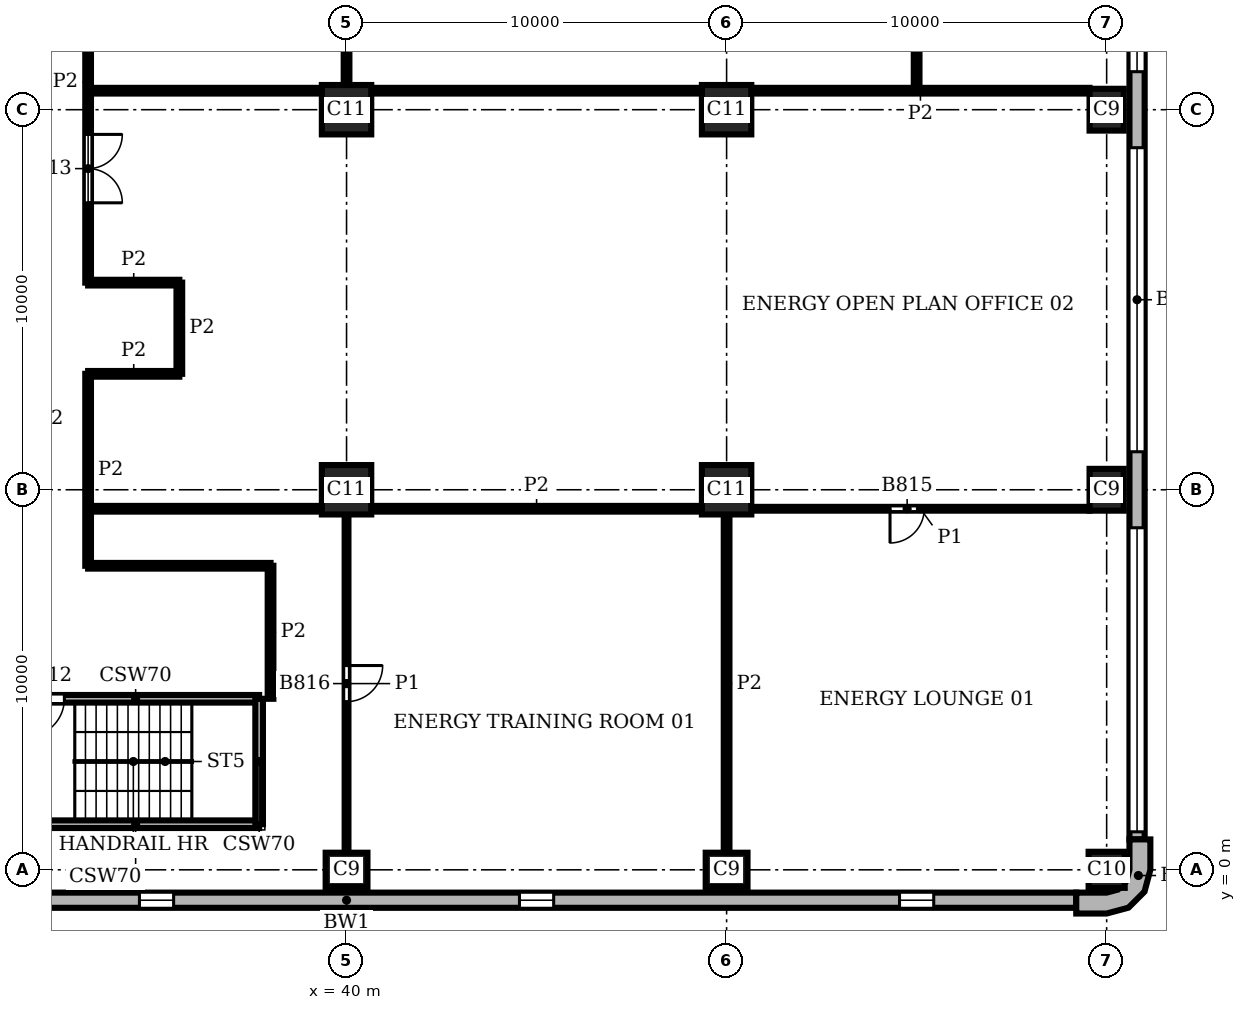
"""IFC4 building model, lengths in metres.
Left out: names, types, materials, properties, quantities, classifications, styles, units other than length and angle.
Written with IfcOpenShell. Run it as: python <this file> out.ifc"""

import sys

from ifc_helpers import new_model, si_unit, direction, frame, frame_2d, origin, origin_2d, place, context, subcontext, project, spatial, polyline, rectangle, outline, extrude, element, fill, save


model = new_model("IFC4")
c1 = context("Model", 3, precision=1e-05, world=origin(), true_north=direction((0.0, 1.0)))
c2 = subcontext(c1, "Body", "Model", "MODEL_VIEW")
j1 = project(units=[si_unit("LENGTHUNIT", "METRE"), si_unit("PLANEANGLEUNIT", "RADIAN")], contexts=[c1])
p1 = place(None, origin())
s1 = spatial("IfcSite", under=j1, at=p1, CompositionType="ELEMENT")
p2 = place(p1, origin())
s2 = spatial("IfcBuilding", under=s1, at=p2, CompositionType="ELEMENT")
p3 = place(p2, frame((0.0, 0.0, 213.6)))
s3 = spatial("IfcBuildingStorey", under=s2, at=p3, CompositionType="ELEMENT", Elevation=213.6)
for number, where, z_axis, x_axis in (
    (1, (40.0, 0.0, 0.0), (0.0, 0.0, 1.0), (1.0, 0.0, 0.0)),
    (2, (50.0, 0.0, 0.0), (0.0, 0.0, 1.0), (1.0, 0.0, 0.0)),
):
    element("IfcColumn", number, at=place(p3, frame(where, z_axis=z_axis, x_axis=x_axis)), inside=s3, PredefinedType="COLUMN", context=c2, shape_type="SweptSolid", body=[
        extrude(rectangle(XDim=1.1, YDim=0.9, at=origin_2d()), origin(), (0.0, 0.0, 1.0), 3.9),
    ])
p4 = place(p3, frame((60.0, 0.0, 0.0), z_axis=(0.0, 0.0, 1.0), x_axis=(1.0, 0.0, 0.0)))
e3 = element("IfcColumn", 3, at=p4, inside=s3, PredefinedType="COLUMN", context=c2, shape_type="SweptSolid", body=[
    extrude(rectangle(XDim=0.95, YDim=0.95, at=origin_2d()), origin(), (0.0, 0.0, 1.0), 3.9),
])
for number, where, z_axis, x_axis in (
    (4, (60.0, 10.0, 0.0), (0.0, 0.0, 1.0), (0.0, 1.0, 0.0)),
    (5, (60.0, 20.0, 0.0), (0.0, 0.0, 1.0), (0.0, 1.0, 0.0)),
):
    element("IfcColumn", number, at=place(p3, frame(where, z_axis=z_axis, x_axis=x_axis)), inside=s3, PredefinedType="COLUMN", context=c2, shape_type="SweptSolid", body=[
        extrude(rectangle(XDim=1.1, YDim=0.9, at=origin_2d()), origin(), (0.0, 0.0, 1.0), 3.9),
    ])
for number, where, z_axis, x_axis in (
    (6, (40.0, 10.0, 0.0), (0.0, 0.0, 1.0), (1.0, 0.0, 0.0)),
    (7, (40.0, 20.0, 0.0), (0.0, 0.0, 1.0), (1.0, 0.0, 0.0)),
    (8, (50.0, 10.0, 0.0), (0.0, 0.0, 1.0), (1.0, 0.0, 0.0)),
    (9, (50.0, 20.0, 0.0), (0.0, 0.0, 1.0), (1.0, 0.0, 0.0)),
):
    element("IfcColumn", number, at=place(p3, frame(where, z_axis=z_axis, x_axis=x_axis)), inside=s3, PredefinedType="COLUMN", context=c2, shape_type="SweptSolid", body=[
        extrude(rectangle(XDim=1.3, YDim=1.3, at=origin_2d()), origin(), (0.0, 0.0, 1.0), 3.9),
    ])
p5 = place(p3, origin())
e10 = element("IfcWall", 10, at=p5, inside=s3, PredefinedType="SOLIDWALL", context=c2, shape_type="SweptSolid", body=[
    extrude(outline(polyline([(59.2, -1.0), (59.2, -1.15), (60.0, -1.15), (60.575, -0.996), (60.996, -0.575), (61.15, 0.0), (61.15, 0.8), (61.0, 0.8), (60.6, 0.8), (60.6, 0.0), (60.52, -0.3), (60.3, -0.52), (60.0, -0.6), (59.2, -0.6), (59.2, -1.0)])), origin(), (0.0, 0.0, 1.0), 3.9),
])
p6 = place(p3, frame((20.8, -0.8, 0.0), z_axis=(0.0, 0.0, 1.0), x_axis=(1.0, 0.0, 0.0)))
e11 = element("IfcWall", 11, at=p6, inside=s3, PredefinedType="SOLIDWALL", context=c2, shape_type="SweptSolid", body=[
    extrude(rectangle(XDim=38.4, YDim=0.4, at=frame_2d((19.2, 0.0))), origin(), (0.0, 0.0, 1.0), 3.9),
])
p7 = place(p6, frame((3.75, 0.0, 0.9)))
e12 = element("IfcOpeningElement", 12, at=p7, cuts=e11, PredefinedType="OPENING", context=c2, shape_type="SweptSolid", body=[
    extrude(rectangle(XDim=0.9, YDim=2.35, at=frame_2d((0.45, 1.175))), frame((0.0, 0.21, 0.0), z_axis=(0.0, -1.0, 0.0), x_axis=(1.0, 0.0, 0.0)), (0.0, 0.0, 1.0), 0.42),
])
p8 = place(p6, frame((13.75, 0.0, 0.9)))
e13 = element("IfcOpeningElement", 13, at=p8, cuts=e11, PredefinedType="OPENING", context=c2, shape_type="SweptSolid", body=[
    extrude(rectangle(XDim=0.9, YDim=2.35, at=frame_2d((0.45, 1.175))), frame((0.0, 0.21, 0.0), z_axis=(0.0, -1.0, 0.0), x_axis=(1.0, 0.0, 0.0)), (0.0, 0.0, 1.0), 0.42),
])
p9 = place(p6, frame((23.75, 0.0, 0.9)))
e14 = element("IfcOpeningElement", 14, at=p9, cuts=e11, PredefinedType="OPENING", context=c2, shape_type="SweptSolid", body=[
    extrude(rectangle(XDim=0.9, YDim=2.35, at=frame_2d((0.45, 1.175))), frame((0.0, 0.21, 0.0), z_axis=(0.0, -1.0, 0.0), x_axis=(1.0, 0.0, 0.0)), (0.0, 0.0, 1.0), 0.42),
])
p10 = place(p6, frame((33.75, 0.0, 0.9)))
e15 = element("IfcOpeningElement", 15, at=p10, cuts=e11, PredefinedType="OPENING", context=c2, shape_type="SweptSolid", body=[
    extrude(rectangle(XDim=0.9, YDim=2.35, at=frame_2d((0.45, 1.175))), frame((0.0, 0.21, 0.0), z_axis=(0.0, -1.0, 0.0), x_axis=(1.0, 0.0, 0.0)), (0.0, 0.0, 1.0), 0.42),
])
p11 = place(p3, frame((60.8, 0.8, 0.0), z_axis=(0.0, 0.0, 1.0), x_axis=(0.0, 1.0, 0.0)))
e16 = element("IfcWall", 16, at=p11, inside=s3, PredefinedType="SOLIDWALL", context=c2, shape_type="SweptSolid", body=[
    extrude(rectangle(XDim=28.4, YDim=0.4, at=frame_2d((14.2, 0.0))), origin(), (0.0, 0.0, 1.0), 3.9),
])
p12 = place(p11, frame((0.2, 0.0, 0.9)))
e17 = element("IfcOpeningElement", 17, at=p12, cuts=e16, PredefinedType="OPENING", context=c2, shape_type="SweptSolid", body=[
    extrude(rectangle(XDim=8.0, YDim=2.35, at=frame_2d((4.0, 1.175))), frame((0.0, 0.21, 0.0), z_axis=(0.0, -1.0, 0.0), x_axis=(1.0, 0.0, 0.0)), (0.0, 0.0, 1.0), 0.42),
])
p13 = place(p11, frame((10.2, 0.0, 0.9)))
e18 = element("IfcOpeningElement", 18, at=p13, cuts=e16, PredefinedType="OPENING", context=c2, shape_type="SweptSolid", body=[
    extrude(rectangle(XDim=8.0, YDim=2.35, at=frame_2d((4.0, 1.175))), frame((0.0, 0.21, 0.0), z_axis=(0.0, -1.0, 0.0), x_axis=(1.0, 0.0, 0.0)), (0.0, 0.0, 1.0), 0.42),
])
p14 = place(p11, frame((20.2, 0.0, 0.9)))
e19 = element("IfcOpeningElement", 19, at=p14, cuts=e16, PredefinedType="OPENING", context=c2, shape_type="SweptSolid", body=[
    extrude(rectangle(XDim=8.0, YDim=2.35, at=frame_2d((4.0, 1.175))), frame((0.0, 0.21, 0.0), z_axis=(0.0, -1.0, 0.0), x_axis=(1.0, 0.0, 0.0)), (0.0, 0.0, 1.0), 0.42),
])
p15 = place(p3, frame((31.2, 1.2, 0.0), z_axis=(0.0, 0.0, 1.0), x_axis=(1.0, 0.0, 0.0)))
e20 = element("IfcWall", 20, at=p15, inside=s3, PredefinedType="SHEAR", context=c2, shape_type="SweptSolid", body=[
    extrude(rectangle(XDim=6.5, YDim=0.2, at=frame_2d((3.25, 0.0))), origin(), (0.0, 0.0, 1.0), 3.58),
])
p16 = place(p3, frame((31.2, 4.5, 0.0), z_axis=(0.0, 0.0, 1.0), x_axis=(1.0, 0.0, 0.0)))
e21 = element("IfcWall", 21, at=p16, inside=s3, PredefinedType="SHEAR", context=c2, shape_type="SweptSolid", body=[
    extrude(rectangle(XDim=6.5, YDim=0.2, at=frame_2d((3.25, 0.0))), origin(), (0.0, 0.0, 1.0), 3.58),
])
p17 = place(p16, frame((0.375, 0.0, 0.0)))
e22 = element("IfcOpeningElement", 22, at=p17, cuts=e21, PredefinedType="OPENING", context=c2, shape_type="SweptSolid", body=[
    extrude(rectangle(XDim=1.0, YDim=2.1, at=frame_2d((0.5, 1.05))), frame((0.0, 0.11, 0.0), z_axis=(0.0, -1.0, 0.0), x_axis=(1.0, 0.0, 0.0)), (0.0, 0.0, 1.0), 0.22),
])
p18 = place(p3, frame((37.7, 1.2, 0.0), z_axis=(0.0, 0.0, 1.0), x_axis=(0.0, 1.0, 0.0)))
e23 = element("IfcWall", 23, at=p18, inside=s3, PredefinedType="SHEAR", context=c2, shape_type="SweptSolid", body=[
    extrude(rectangle(XDim=3.3, YDim=0.2, at=frame_2d((1.65, 0.0))), origin(), (0.0, 0.0, 1.0), 3.58),
])
p19 = place(p3, frame((40.0, 0.45, 0.0), z_axis=(0.0, 0.0, 1.0), x_axis=(0.0, 1.0, 0.0)))
e24 = element("IfcWall", 24, at=p19, inside=s3, PredefinedType="PARTITIONING", context=c2, shape_type="SweptSolid", body=[
    extrude(rectangle(XDim=8.9, YDim=0.1, at=frame_2d((4.45, 0.0))), origin(), (0.0, 0.0, 1.0), 3.58),
])
p20 = place(p19, frame((3.975, 0.0, 0.0)))
e25 = element("IfcOpeningElement", 25, at=p20, cuts=e24, PredefinedType="OPENING", context=c2, shape_type="SweptSolid", body=[
    extrude(rectangle(XDim=0.95, YDim=2.1, at=frame_2d((0.475, 1.05))), frame((0.0, 0.06, 0.0), z_axis=(0.0, -1.0, 0.0), x_axis=(1.0, 0.0, 0.0)), (0.0, 0.0, 1.0), 0.12),
])
p21 = place(p3, frame((50.65, 9.5, 0.0), z_axis=(0.0, 0.0, 1.0), x_axis=(1.0, 0.0, 0.0)))
e26 = element("IfcWall", 26, at=p21, inside=s3, PredefinedType="PARTITIONING", context=c2, shape_type="SweptSolid", body=[
    extrude(rectangle(XDim=8.9, YDim=0.1, at=frame_2d((4.45, 0.0))), origin(), (0.0, 0.0, 1.0), 3.58),
])
p22 = place(p21, frame((3.65, 0.0, 0.0)))
e27 = element("IfcOpeningElement", 27, at=p22, cuts=e26, PredefinedType="OPENING", context=c2, shape_type="SweptSolid", body=[
    extrude(rectangle(XDim=0.9, YDim=2.1, at=frame_2d((0.45, 1.05))), frame((0.0, 0.06, 0.0), z_axis=(0.0, -1.0, 0.0), x_axis=(1.0, 0.0, 0.0)), (0.0, 0.0, 1.0), 0.12),
])
p23 = place(p3, frame((33.2, 8.0, 0.0), z_axis=(0.0, 0.0, 1.0), x_axis=(0.0, 1.0, 0.0)))
e28 = element("IfcWall", 28, at=p23, inside=s3, PredefinedType="PARTITIONING", context=c2, shape_type="SweptSolid", body=[
    extrude(rectangle(XDim=5.05, YDim=0.15, at=frame_2d((2.525, 0.0))), origin(), (0.0, 0.0, 1.0), 3.58),
])
p24 = place(p3, frame((33.2, 15.45, 0.0), z_axis=(0.0, 0.0, 1.0), x_axis=(0.0, 1.0, 0.0)))
e29 = element("IfcWall", 29, at=p24, inside=s3, PredefinedType="PARTITIONING", context=c2, shape_type="SweptSolid", body=[
    extrude(rectangle(XDim=10.55, YDim=0.15, at=frame_2d((5.275, 0.0))), origin(), (0.0, 0.0, 1.0), 3.58),
])
p25 = place(p24, frame((2.1, 0.0, 0.0)))
e30 = element("IfcOpeningElement", 30, at=p25, cuts=e29, PredefinedType="OPENING", context=c2, shape_type="SweptSolid", body=[
    extrude(rectangle(XDim=1.8, YDim=2.1, at=frame_2d((0.9, 1.05))), frame((0.0, 0.085, 0.0), z_axis=(0.0, -1.0, 0.0), x_axis=(1.0, 0.0, 0.0)), (0.0, 0.0, 1.0), 0.17),
])
p26 = place(p3, frame((35.6, 13.05, 0.0), z_axis=(0.0, 0.0, 1.0), x_axis=(0.0, 1.0, 0.0)))
e31 = element("IfcWall", 31, at=p26, inside=s3, PredefinedType="PARTITIONING", context=c2, shape_type="SweptSolid", body=[
    extrude(rectangle(XDim=2.4, YDim=0.15, at=frame_2d((1.2, 0.0))), origin(), (0.0, 0.0, 1.0), 3.58),
])
p27 = place(p3, frame((38.0, 4.5, 0.0), z_axis=(0.0, 0.0, 1.0), x_axis=(0.0, 1.0, 0.0)))
e32 = element("IfcWall", 32, at=p27, inside=s3, PredefinedType="PARTITIONING", context=c2, shape_type="SweptSolid", body=[
    extrude(rectangle(XDim=3.5, YDim=0.15, at=frame_2d((1.75, 0.0))), origin(), (0.0, 0.0, 1.0), 3.58),
])
p28 = place(p3, frame((40.0, 20.65, 0.0), z_axis=(0.0, 0.0, 1.0), x_axis=(0.0, 1.0, 0.0)))
e33 = element("IfcWall", 33, at=p28, inside=s3, PredefinedType="PARTITIONING", context=c2, shape_type="SweptSolid", body=[
    extrude(rectangle(XDim=5.35, YDim=0.15, at=frame_2d((2.675, 0.0))), origin(), (0.0, 0.0, 1.0), 3.58),
])
p29 = place(p3, frame((50.0, 0.45, 0.0), z_axis=(0.0, 0.0, 1.0), x_axis=(0.0, 1.0, 0.0)))
e34 = element("IfcWall", 34, at=p29, inside=s3, PredefinedType="PARTITIONING", context=c2, shape_type="SweptSolid", body=[
    extrude(rectangle(XDim=8.9, YDim=0.15, at=frame_2d((4.45, 0.0))), origin(), (0.0, 0.0, 1.0), 3.58),
])
p30 = place(p3, frame((55.0, 20.5, 0.0), z_axis=(0.0, 0.0, 1.0), x_axis=(0.0, 1.0, 0.0)))
e35 = element("IfcWall", 35, at=p30, inside=s3, PredefinedType="PARTITIONING", context=c2, shape_type="SweptSolid", body=[
    extrude(rectangle(XDim=5.5, YDim=0.15, at=frame_2d((2.75, 0.0))), origin(), (0.0, 0.0, 1.0), 3.58),
])
p31 = place(p3, frame((33.2, 8.0, 0.0), z_axis=(0.0, 0.0, 1.0), x_axis=(1.0, 0.0, 0.0)))
e36 = element("IfcWall", 36, at=p31, inside=s3, PredefinedType="PARTITIONING", context=c2, shape_type="SweptSolid", body=[
    extrude(rectangle(XDim=4.8, YDim=0.15, at=frame_2d((2.4, 0.0))), origin(), (0.0, 0.0, 1.0), 3.58),
])
p32 = place(p3, frame((33.2, 9.5, 0.0), z_axis=(0.0, 0.0, 1.0), x_axis=(1.0, 0.0, 0.0)))
e37 = element("IfcWall", 37, at=p32, inside=s3, PredefinedType="PARTITIONING", context=c2, shape_type="SweptSolid", body=[
    extrude(rectangle(XDim=6.15, YDim=0.15, at=frame_2d((3.075, 0.0))), origin(), (0.0, 0.0, 1.0), 3.58),
])
p33 = place(p3, frame((40.65, 9.5, 0.0), z_axis=(0.0, 0.0, 1.0), x_axis=(1.0, 0.0, 0.0)))
e38 = element("IfcWall", 38, at=p33, inside=s3, PredefinedType="PARTITIONING", context=c2, shape_type="SweptSolid", body=[
    extrude(rectangle(XDim=8.7, YDim=0.15, at=frame_2d((4.35, 0.0))), origin(), (0.0, 0.0, 1.0), 3.58),
])
for number, where, z_axis, x_axis in (
    (39, (33.2, 13.05, 0.0), (0.0, 0.0, 1.0), (1.0, 0.0, 0.0)),
    (40, (33.2, 15.45, 0.0), (0.0, 0.0, 1.0), (1.0, 0.0, 0.0)),
):
    element("IfcWall", number, at=place(p3, frame(where, z_axis=z_axis, x_axis=x_axis)), inside=s3, PredefinedType="PARTITIONING", context=c2, shape_type="SweptSolid", body=[
        extrude(rectangle(XDim=2.4, YDim=0.15, at=frame_2d((1.2, 0.0))), origin(), (0.0, 0.0, 1.0), 3.58),
    ])
p34 = place(p3, frame((33.2, 20.5, 0.0), z_axis=(0.0, 0.0, 1.0), x_axis=(1.0, 0.0, 0.0)))
e41 = element("IfcWall", 41, at=p34, inside=s3, PredefinedType="PARTITIONING", context=c2, shape_type="SweptSolid", body=[
    extrude(rectangle(XDim=6.15, YDim=0.15, at=frame_2d((3.075, 0.0))), origin(), (0.0, 0.0, 1.0), 3.58),
])
p35 = place(p3, frame((40.65, 20.5, 0.0), z_axis=(0.0, 0.0, 1.0), x_axis=(1.0, 0.0, 0.0)))
e42 = element("IfcWall", 42, at=p35, inside=s3, PredefinedType="PARTITIONING", context=c2, shape_type="SweptSolid", body=[
    extrude(rectangle(XDim=8.7, YDim=0.15, at=frame_2d((4.35, 0.0))), origin(), (0.0, 0.0, 1.0), 3.58),
])
p36 = place(p3, frame((50.65, 20.5, 0.0), z_axis=(0.0, 0.0, 1.0), x_axis=(1.0, 0.0, 0.0)))
e43 = element("IfcWall", 43, at=p36, inside=s3, PredefinedType="PARTITIONING", context=c2, shape_type="SweptSolid", body=[
    extrude(rectangle(XDim=8.9, YDim=0.15, at=frame_2d((4.45, 0.0))), origin(), (0.0, 0.0, 1.0), 3.58),
])
p37 = place(p8, origin())
e44 = element("IfcWindow", 44, at=p37, inside=s3, PartitioningType="SINGLE_PANEL", PredefinedType="WINDOW", context=c2, shape_type="SweptSolid", body=[
    extrude(rectangle(XDim=0.9, YDim=2.35, at=frame_2d((0.45, 1.175))), frame((0.0, 0.16, 0.0), z_axis=(0.0, -1.0, 0.0), x_axis=(1.0, 0.0, 0.0)), (0.0, 0.0, 1.0), 0.06),
])
fill(e13, e44)
p38 = place(p9, origin())
e45 = element("IfcWindow", 45, at=p38, inside=s3, PartitioningType="SINGLE_PANEL", PredefinedType="WINDOW", context=c2, shape_type="SweptSolid", body=[
    extrude(rectangle(XDim=0.9, YDim=2.35, at=frame_2d((0.45, 1.175))), frame((0.0, 0.16, 0.0), z_axis=(0.0, -1.0, 0.0), x_axis=(1.0, 0.0, 0.0)), (0.0, 0.0, 1.0), 0.06),
])
fill(e14, e45)
p39 = place(p10, origin())
e46 = element("IfcWindow", 46, at=p39, inside=s3, PartitioningType="SINGLE_PANEL", PredefinedType="WINDOW", context=c2, shape_type="SweptSolid", body=[
    extrude(rectangle(XDim=0.9, YDim=2.35, at=frame_2d((0.45, 1.175))), frame((0.0, 0.16, 0.0), z_axis=(0.0, -1.0, 0.0), x_axis=(1.0, 0.0, 0.0)), (0.0, 0.0, 1.0), 0.06),
])
fill(e15, e46)
p40 = place(p12, origin())
e47 = element("IfcWindow", 47, at=p40, inside=s3, PartitioningType="SINGLE_PANEL", PredefinedType="WINDOW", context=c2, shape_type="SweptSolid", body=[
    extrude(rectangle(XDim=8.0, YDim=2.35, at=frame_2d((4.0, 1.175))), frame((0.0, 0.16, 0.0), z_axis=(0.0, -1.0, 0.0), x_axis=(1.0, 0.0, 0.0)), (0.0, 0.0, 1.0), 0.06),
])
fill(e17, e47)
p41 = place(p13, origin())
e48 = element("IfcWindow", 48, at=p41, inside=s3, PartitioningType="SINGLE_PANEL", PredefinedType="WINDOW", context=c2, shape_type="SweptSolid", body=[
    extrude(rectangle(XDim=8.0, YDim=2.35, at=frame_2d((4.0, 1.175))), frame((0.0, 0.16, 0.0), z_axis=(0.0, -1.0, 0.0), x_axis=(1.0, 0.0, 0.0)), (0.0, 0.0, 1.0), 0.06),
])
fill(e18, e48)
p42 = place(p14, origin())
e49 = element("IfcWindow", 49, at=p42, inside=s3, PartitioningType="SINGLE_PANEL", PredefinedType="WINDOW", context=c2, shape_type="SweptSolid", body=[
    extrude(rectangle(XDim=8.0, YDim=2.35, at=frame_2d((4.0, 1.175))), frame((0.0, 0.16, 0.0), z_axis=(0.0, -1.0, 0.0), x_axis=(1.0, 0.0, 0.0)), (0.0, 0.0, 1.0), 0.06),
])
fill(e19, e49)
p43 = place(p17, frame((1.0, 0.0, 0.0), z_axis=(0.0, 0.0, 1.0), x_axis=(-1.0, 0.0, 0.0)))
e50 = element("IfcDoor", 50, at=p43, inside=s3, OperationType="SINGLE_SWING_RIGHT", PredefinedType="DOOR", context=c2, shape_type="SweptSolid", body=[
    extrude(rectangle(XDim=1.0, YDim=2.1, at=frame_2d((0.5, 1.05))), frame((0.0, 0.025, 0.0), z_axis=(0.0, -1.0, 0.0), x_axis=(1.0, 0.0, 0.0)), (0.0, 0.0, 1.0), 0.05),
])
fill(e22, e50)
p44 = place(p25, frame((1.8, 0.0, 0.0), z_axis=(0.0, 0.0, 1.0), x_axis=(-1.0, 0.0, 0.0)))
e51 = element("IfcDoor", 51, at=p44, inside=s3, OperationType="DOUBLE_DOOR_SINGLE_SWING", PredefinedType="DOOR", context=c2, shape_type="SweptSolid", body=[
    extrude(rectangle(XDim=1.8, YDim=2.1, at=frame_2d((0.9, 1.05))), frame((0.0, 0.025, 0.0), z_axis=(0.0, -1.0, 0.0), x_axis=(1.0, 0.0, 0.0)), (0.0, 0.0, 1.0), 0.05),
])
fill(e30, e51)
p45 = place(p22, frame((0.9, 0.0, 0.0), z_axis=(0.0, 0.0, 1.0), x_axis=(-1.0, 0.0, 0.0)))
e52 = element("IfcDoor", 52, at=p45, inside=s3, OperationType="SINGLE_SWING_RIGHT", PredefinedType="DOOR", context=c2, shape_type="SweptSolid", body=[
    extrude(rectangle(XDim=0.9, YDim=2.1, at=frame_2d((0.45, 1.05))), frame((0.0, 0.025, 0.0), z_axis=(0.0, -1.0, 0.0), x_axis=(1.0, 0.0, 0.0)), (0.0, 0.0, 1.0), 0.05),
])
fill(e27, e52)
p46 = place(p20, frame((0.95, 0.0, 0.0), z_axis=(0.0, 0.0, 1.0), x_axis=(-1.0, 0.0, 0.0)))
e53 = element("IfcDoor", 53, at=p46, inside=s3, OperationType="SINGLE_SWING_LEFT", PredefinedType="DOOR", context=c2, shape_type="SweptSolid", body=[
    extrude(rectangle(XDim=0.95, YDim=2.1, at=frame_2d((0.475, 1.05))), frame((0.0, 0.025, 0.0), z_axis=(0.0, -1.0, 0.0), x_axis=(1.0, 0.0, 0.0)), (0.0, 0.0, 1.0), 0.05),
])
fill(e25, e53)
save(model, sys.argv[1])
